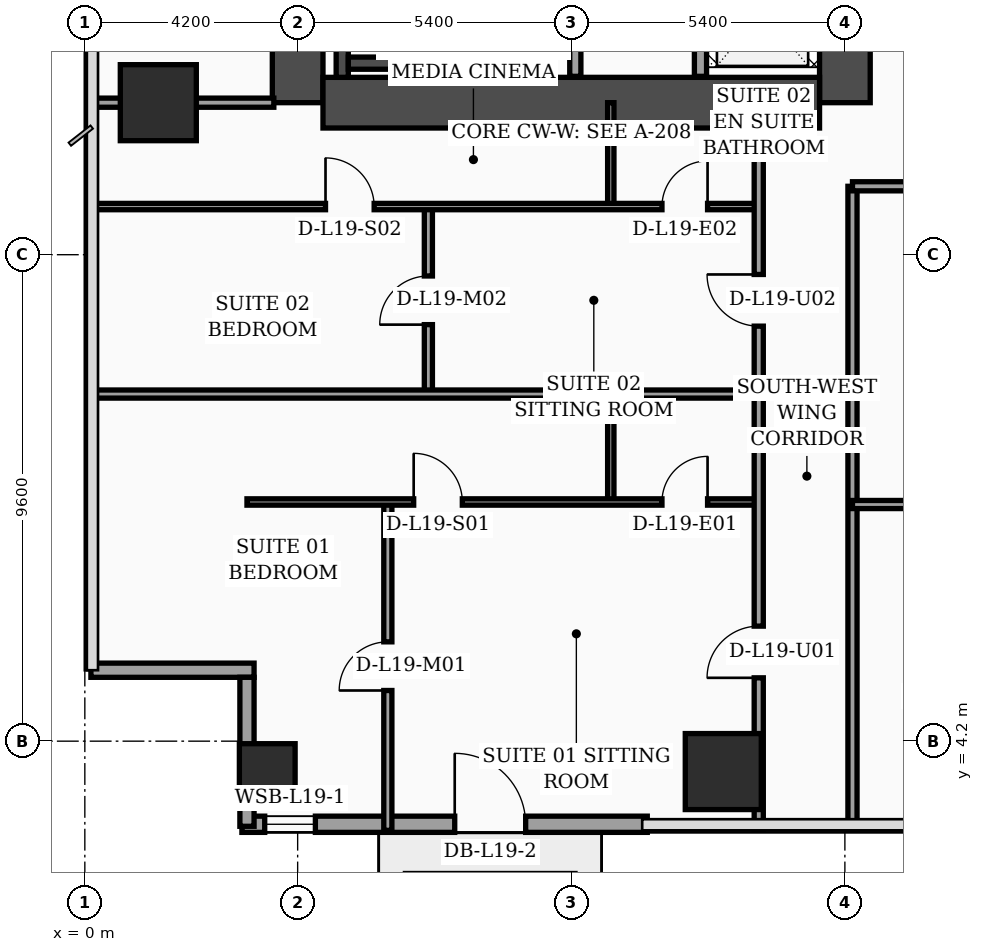
"""IFC4 building model, lengths in metres.
Left out: names, types, materials, properties, quantities, classifications, styles, units other than length and angle.
Written with IfcOpenShell. Run it as: python <this file> out.ifc"""

import sys

from ifc_helpers import new_model, si_unit, direction, frame, frame_2d, origin, origin_2d, place, context, subcontext, project, spatial, rectangle, hollow_rectangle, extrude, element, fill, save


model = new_model("IFC4")
c1 = context("Model", 3, precision=1e-05, world=origin(), true_north=direction((0.0, 1.0)))
c2 = subcontext(c1, "Body", "Model", "MODEL_VIEW")
j1 = project(units=[si_unit("LENGTHUNIT", "METRE"), si_unit("PLANEANGLEUNIT", "RADIAN")], contexts=[c1])
p1 = place(None, origin())
s1 = spatial("IfcSite", under=j1, at=p1, CompositionType="ELEMENT")
p2 = place(p1, origin())
s2 = spatial("IfcBuilding", under=s1, at=p2, CompositionType="ELEMENT")
p3 = place(p2, frame((0.0, 0.0, 81.2)))
s3 = spatial("IfcBuildingStorey", under=s2, at=p3, CompositionType="ELEMENT", Elevation=81.2)
p4 = place(p3, frame((4.2, 16.8, 0.0), z_axis=(0.0, 0.0, 1.0), x_axis=(0.0, 1.0, 0.0)))
e1 = element("IfcWall", 1, at=p4, inside=s3, PredefinedType="SHEAR", context=c2, shape_type="SweptSolid", body=[
    extrude(rectangle(XDim=21.6, YDim=1.0, at=frame_2d((10.8, 0.0))), origin(), (0.0, 0.0, 1.0), 3.56),
])
p5 = place(p3, frame((15.0, 16.8, 0.0), z_axis=(0.0, 0.0, 1.0), x_axis=(0.0, 1.0, 0.0)))
e2 = element("IfcWall", 2, at=p5, inside=s3, PredefinedType="SHEAR", context=c2, shape_type="SweptSolid", body=[
    extrude(rectangle(XDim=21.6, YDim=1.0, at=frame_2d((10.8, 0.0))), origin(), (0.0, 0.0, 1.0), 3.56),
])
p6 = place(p5, frame((8.65, 0.0, 0.0)))
e3 = element("IfcOpeningElement", 3, at=p6, cuts=e2, PredefinedType="OPENING", context=c2, shape_type="SweptSolid", body=[
    extrude(rectangle(XDim=1.1, YDim=2.2, at=frame_2d((0.55, 1.1))), frame((0.0, 0.51, 0.0), z_axis=(0.0, -1.0, 0.0), x_axis=(1.0, 0.0, 0.0)), (0.0, 0.0, 1.0), 1.02),
])
p7 = place(p5, frame((1.25, 0.0, 0.0)))
e4 = element("IfcOpeningElement", 4, at=p7, cuts=e2, PredefinedType="OPENING", context=c2, shape_type="SweptSolid", body=[
    extrude(rectangle(XDim=1.1, YDim=2.2, at=frame_2d((0.55, 1.1))), frame((0.0, 0.51, 0.0), z_axis=(0.0, -1.0, 0.0), x_axis=(1.0, 0.0, 0.0)), (0.0, 0.0, 1.0), 1.02),
])
p8 = place(p5, frame((3.8, 0.0, 0.0)))
e5 = element("IfcOpeningElement", 5, at=p8, cuts=e2, PredefinedType="OPENING", context=c2, shape_type="SweptSolid", body=[
    extrude(rectangle(XDim=1.1, YDim=2.2, at=frame_2d((0.55, 1.1))), frame((0.0, 0.51, 0.0), z_axis=(0.0, -1.0, 0.0), x_axis=(1.0, 0.0, 0.0)), (0.0, 0.0, 1.0), 1.02),
])
p9 = place(p5, frame((6.35, 0.0, 0.0)))
e6 = element("IfcOpeningElement", 6, at=p9, cuts=e2, PredefinedType="OPENING", context=c2, shape_type="SweptSolid", body=[
    extrude(rectangle(XDim=1.1, YDim=2.2, at=frame_2d((0.55, 1.1))), frame((0.0, 0.51, 0.0), z_axis=(0.0, -1.0, 0.0), x_axis=(1.0, 0.0, 0.0)), (0.0, 0.0, 1.0), 1.02),
])
p10 = place(p3, frame((4.7, 16.8, 0.0), z_axis=(0.0, 0.0, 1.0), x_axis=(1.0, 0.0, 0.0)))
e7 = element("IfcWall", 7, at=p10, inside=s3, PredefinedType="SHEAR", context=c2, shape_type="SweptSolid", body=[
    extrude(rectangle(XDim=9.8, YDim=1.0, at=frame_2d((4.9, 0.0))), origin(), (0.0, 0.0, 1.0), 3.56),
])
p11 = place(p3, frame((5.08, 17.3, 0.0), z_axis=(0.0, 0.0, 1.0), x_axis=(0.0, 1.0, 0.0)))
e8 = element("IfcWall", 8, at=p11, inside=s3, PredefinedType="SOLIDWALL", context=c2, shape_type="SweptSolid", body=[
    extrude(rectangle(XDim=9.49, YDim=0.24, at=frame_2d((4.745, 0.0))), origin(), (0.0, 0.0, 1.0), 3.56),
])
p12 = place(p3, frame((8.42, 17.3, 0.0), z_axis=(0.0, 0.0, 1.0), x_axis=(0.0, 1.0, 0.0)))
e9 = element("IfcWall", 9, at=p12, inside=s3, PredefinedType="SOLIDWALL", context=c2, shape_type="SweptSolid", body=[
    extrude(rectangle(XDim=9.49, YDim=0.24, at=frame_2d((4.745, 0.0))), origin(), (0.0, 0.0, 1.0), 3.56),
])
p13 = place(p12, frame((0.35, 0.0, 0.0)))
e10 = element("IfcOpeningElement", 10, at=p13, cuts=e9, PredefinedType="OPENING", context=c2, shape_type="SweptSolid", body=[
    extrude(rectangle(XDim=1.15, YDim=2.2, at=frame_2d((0.575, 1.1))), frame((0.0, 0.13, 0.0), z_axis=(0.0, -1.0, 0.0), x_axis=(1.0, 0.0, 0.0)), (0.0, 0.0, 1.0), 0.26),
])
p14 = place(p3, frame((5.2, 17.58, 0.0), z_axis=(0.0, 0.0, 1.0), x_axis=(1.0, 0.0, 0.0)))
e11 = element("IfcWall", 11, at=p14, inside=s3, PredefinedType="SOLIDWALL", context=c2, shape_type="SweptSolid", body=[
    extrude(rectangle(XDim=3.1, YDim=0.24, at=frame_2d((1.55, 0.0))), origin(), (0.0, 0.0, 1.0), 3.56),
])
p15 = place(p3, frame((3.6, 3.6, 0.0), z_axis=(0.0, 0.0, 1.0), x_axis=(1.0, 0.0, 0.0)))
e12 = element("IfcColumn", 12, at=p15, inside=s3, PredefinedType="COLUMN", context=c2, shape_type="SweptSolid", body=[
    extrude(hollow_rectangle(XDim=1.1, YDim=1.1, WallThickness=0.045, at=origin_2d()), origin(), (0.0, 0.0, 1.0), 3.56),
])
for number, where, z_axis, x_axis in (
    (13, (1.45, 16.8, 0.0), (0.0, 0.0, 1.0), (1.0, 0.0, 0.0)),
    (14, (12.6, 3.6, 0.0), (0.0, 0.0, 1.0), (1.0, 0.0, 0.0)),
):
    element("IfcColumn", number, at=place(p3, frame(where, z_axis=z_axis, x_axis=x_axis)), inside=s3, PredefinedType="COLUMN", context=c2, shape_type="SweptSolid", body=[
        extrude(rectangle(XDim=1.5, YDim=1.5, at=origin_2d()), origin(), (0.0, 0.0, 1.0), 3.56),
    ])
p16 = place(p3, frame((3.1, 2.56, 0.0), z_axis=(0.0, 0.0, 1.0), x_axis=(1.0, 0.0, 0.0)))
e15 = element("IfcWall", 15, at=p16, inside=s3, PredefinedType="SOLIDWALL", context=c2, shape_type="SweptSolid", body=[
    extrude(rectangle(XDim=8.0, YDim=0.32, at=frame_2d((4.0, 0.0))), origin(), (0.0, 0.0, 1.0), 3.56),
])
p17 = place(p16, frame((0.45, 0.0, 0.75)))
e16 = element("IfcOpeningElement", 16, at=p17, cuts=e15, PredefinedType="OPENING", context=c2, shape_type="SweptSolid", body=[
    extrude(rectangle(XDim=1.0, YDim=1.6, at=frame_2d((0.5, 0.8))), frame((0.0, 0.17, 0.0), z_axis=(0.0, -1.0, 0.0), x_axis=(1.0, 0.0, 0.0)), (0.0, 0.0, 1.0), 0.34),
])
p18 = place(p16, frame((4.2, 0.0, 0.0)))
e17 = element("IfcOpeningElement", 17, at=p18, cuts=e15, PredefinedType="OPENING", context=c2, shape_type="SweptSolid", body=[
    extrude(rectangle(XDim=1.4, YDim=2.25, at=frame_2d((0.7, 1.125))), frame((0.0, 0.17, 0.0), z_axis=(0.0, -1.0, 0.0), x_axis=(1.0, 0.0, 0.0)), (0.0, 0.0, 1.0), 0.34),
])
p19 = place(p3, frame((0.12, 5.6, 0.0), z_axis=(0.0, 0.0, 1.0), x_axis=(1.0, 0.0, 0.0)))
e18 = element("IfcWall", 18, at=p19, inside=s3, PredefinedType="SOLIDWALL", context=c2, shape_type="SweptSolid", body=[
    extrude(rectangle(XDim=3.22, YDim=0.28, at=frame_2d((1.61, 0.0))), origin(), (0.0, 0.0, 1.0), 2.84),
])
p20 = place(p3, frame((3.2, 5.46, 0.0), z_axis=(0.0, 0.0, 1.0), x_axis=(0.0, -1.0, 0.0)))
e19 = element("IfcWall", 19, at=p20, inside=s3, PredefinedType="SOLIDWALL", context=c2, shape_type="SweptSolid", body=[
    extrude(rectangle(XDim=2.94, YDim=0.28, at=frame_2d((1.47, 0.0))), origin(), (0.0, 0.0, 1.0), 2.84),
])
p21 = place(p3, frame((9.68, 17.32, 0.0), z_axis=(0.0, 0.0, 1.0), x_axis=(0.0, 1.0, 0.0)))
e20 = element("IfcWall", 20, at=p21, inside=s3, PredefinedType="SOLIDWALL", context=c2, shape_type="SweptSolid", body=[
    extrude(rectangle(XDim=7.68, YDim=0.22, at=frame_2d((3.84, 0.0))), origin(), (0.0, 0.0, 1.0), 3.56),
])
p22 = place(p3, frame((12.15, 17.32, 0.0), z_axis=(0.0, 0.0, 1.0), x_axis=(0.0, 1.0, 0.0)))
e21 = element("IfcWall", 21, at=p22, inside=s3, PredefinedType="SOLIDWALL", context=c2, shape_type="SweptSolid", body=[
    extrude(rectangle(XDim=7.65, YDim=0.24, at=frame_2d((3.825, 0.0))), origin(), (0.0, 0.0, 1.0), 3.56),
])
p23 = place(p3, frame((0.08, 16.8, 0.0), z_axis=(0.0, 0.0, 1.0), x_axis=(1.0, 0.0, 0.0)))
e22 = element("IfcWall", 22, at=p23, inside=s3, PredefinedType="PARTITIONING", context=c2, shape_type="SweptSolid", body=[
    extrude(rectangle(XDim=3.65, YDim=0.18, at=frame_2d((1.825, 0.0))), origin(), (0.0, 0.0, 1.0), 2.84),
])
p24 = place(p3, frame((10.38, 8.92, 0.0), z_axis=(0.0, 0.0, 1.0), x_axis=(0.0, 1.0, 0.0)))
e23 = element("IfcWall", 23, at=p24, inside=s3, PredefinedType="PARTITIONING", context=c2, shape_type="SweptSolid", body=[
    extrude(rectangle(XDim=2.13, YDim=0.125, at=frame_2d((1.065, 0.0))), origin(), (0.0, 0.0, 1.0), 3.09),
])
p25 = place(p3, frame((5.98, 2.44, 0.0), z_axis=(0.0, 0.0, 1.0), x_axis=(0.0, 1.0, 0.0)))
e24 = element("IfcWall", 24, at=p25, inside=s3, PredefinedType="PARTITIONING", context=c2, shape_type="SweptSolid", body=[
    extrude(rectangle(XDim=6.48, YDim=0.16, at=frame_2d((3.24, 0.0))), origin(), (0.0, 0.0, 1.0), 3.04),
])
p26 = place(p25, frame((2.76, 0.0, 0.0)))
e25 = element("IfcOpeningElement", 25, at=p26, cuts=e24, PredefinedType="OPENING", context=c2, shape_type="SweptSolid", body=[
    extrude(rectangle(XDim=0.96, YDim=2.2, at=frame_2d((0.48, 1.1))), frame((0.0, 0.09, 0.0), z_axis=(0.0, -1.0, 0.0), x_axis=(1.0, 0.0, 0.0)), (0.0, 0.0, 1.0), 0.18),
])
p27 = place(p3, frame((3.2, 8.92, 0.0), z_axis=(0.0, 0.0, 1.0), x_axis=(1.0, 0.0, 0.0)))
e26 = element("IfcWall", 26, at=p27, inside=s3, PredefinedType="PARTITIONING", context=c2, shape_type="SweptSolid", body=[
    extrude(rectangle(XDim=10.1, YDim=0.125, at=frame_2d((5.05, 0.0))), origin(), (0.0, 0.0, 1.0), 2.84),
])
p28 = place(p27, frame((3.29, 0.0, 0.0)))
e27 = element("IfcOpeningElement", 27, at=p28, cuts=e26, PredefinedType="OPENING", context=c2, shape_type="SweptSolid", body=[
    extrude(rectangle(XDim=0.96, YDim=2.2, at=frame_2d((0.48, 1.1))), frame((0.0, 0.073, 0.0), z_axis=(0.0, -1.0, 0.0), x_axis=(1.0, 0.0, 0.0)), (0.0, 0.0, 1.0), 0.145),
])
p29 = place(p27, frame((8.19, 0.0, 0.0)))
e28 = element("IfcOpeningElement", 28, at=p29, cuts=e26, PredefinedType="OPENING", context=c2, shape_type="SweptSolid", body=[
    extrude(rectangle(XDim=0.9, YDim=2.15, at=frame_2d((0.45, 1.075))), frame((0.0, 0.073, 0.0), z_axis=(0.0, -1.0, 0.0), x_axis=(1.0, 0.0, 0.0)), (0.0, 0.0, 1.0), 0.145),
])
p30 = place(p3, frame((10.38, 14.75, 0.0), z_axis=(0.0, 0.0, 1.0), x_axis=(0.0, 1.0, 0.0)))
e29 = element("IfcWall", 29, at=p30, inside=s3, PredefinedType="PARTITIONING", context=c2, shape_type="SweptSolid", body=[
    extrude(rectangle(XDim=2.05, YDim=0.125, at=frame_2d((1.025, 0.0))), origin(), (0.0, 0.0, 1.0), 3.56),
])
p31 = place(p3, frame((6.78, 11.05, 0.0), z_axis=(0.0, 0.0, 1.0), x_axis=(0.0, 1.0, 0.0)))
e30 = element("IfcWall", 30, at=p31, inside=s3, PredefinedType="PARTITIONING", context=c2, shape_type="SweptSolid", body=[
    extrude(rectangle(XDim=3.7, YDim=0.16, at=frame_2d((1.85, 0.0))), origin(), (0.0, 0.0, 1.0), 3.56),
])
p32 = place(p31, frame((1.37, 0.0, 0.0)))
e31 = element("IfcOpeningElement", 31, at=p32, cuts=e30, PredefinedType="OPENING", context=c2, shape_type="SweptSolid", body=[
    extrude(rectangle(XDim=0.96, YDim=2.2, at=frame_2d((0.48, 1.1))), frame((0.0, 0.09, 0.0), z_axis=(0.0, -1.0, 0.0), x_axis=(1.0, 0.0, 0.0)), (0.0, 0.0, 1.0), 0.18),
])
p33 = place(p3, frame((0.08, 14.75, 0.0), z_axis=(0.0, 0.0, 1.0), x_axis=(1.0, 0.0, 0.0)))
e32 = element("IfcWall", 32, at=p33, inside=s3, PredefinedType="PARTITIONING", context=c2, shape_type="SweptSolid", body=[
    extrude(rectangle(XDim=13.22, YDim=0.125, at=frame_2d((6.61, 0.0))), origin(), (0.0, 0.0, 1.0), 2.84),
])
p34 = place(p33, frame((4.67, 0.0, 0.0)))
e33 = element("IfcOpeningElement", 33, at=p34, cuts=e32, PredefinedType="OPENING", context=c2, shape_type="SweptSolid", body=[
    extrude(rectangle(XDim=0.96, YDim=2.2, at=frame_2d((0.48, 1.1))), frame((0.0, 0.073, 0.0), z_axis=(0.0, -1.0, 0.0), x_axis=(1.0, 0.0, 0.0)), (0.0, 0.0, 1.0), 0.145),
])
p35 = place(p33, frame((11.31, 0.0, 0.0)))
e34 = element("IfcOpeningElement", 34, at=p35, cuts=e32, PredefinedType="OPENING", context=c2, shape_type="SweptSolid", body=[
    extrude(rectangle(XDim=0.9, YDim=2.15, at=frame_2d((0.45, 1.075))), frame((0.0, 0.073, 0.0), z_axis=(0.0, -1.0, 0.0), x_axis=(1.0, 0.0, 0.0)), (0.0, 0.0, 1.0), 0.145),
])
p36 = place(p3, frame((0.08, 11.05, 0.0), z_axis=(0.0, 0.0, 1.0), x_axis=(1.0, 0.0, 0.0)))
e35 = element("IfcWall", 35, at=p36, inside=s3, PredefinedType="PARTITIONING", context=c2, shape_type="SweptSolid", body=[
    extrude(rectangle(XDim=13.22, YDim=0.16, at=frame_2d((6.61, 0.0))), origin(), (0.0, 0.0, 1.0), 2.84),
])
p37 = place(p3, frame((13.3, 2.44, 0.0), z_axis=(0.0, 0.0, 1.0), x_axis=(0.0, 1.0, 0.0)))
e36 = element("IfcWall", 36, at=p37, inside=s3, PredefinedType="PARTITIONING", context=c2, shape_type="SweptSolid", body=[
    extrude(rectangle(XDim=14.36, YDim=0.18, at=frame_2d((7.18, 0.0))), origin(), (0.0, 0.0, 1.0), 3.04),
])
p38 = place(p37, frame((3.01, 0.0, 0.0)))
e37 = element("IfcOpeningElement", 37, at=p38, cuts=e36, PredefinedType="OPENING", context=c2, shape_type="SweptSolid", body=[
    extrude(rectangle(XDim=1.02, YDim=2.2, at=frame_2d((0.51, 1.1))), frame((0.0, 0.1, 0.0), z_axis=(0.0, -1.0, 0.0), x_axis=(1.0, 0.0, 0.0)), (0.0, 0.0, 1.0), 0.2),
])
p39 = place(p37, frame((9.95, 0.0, 0.0)))
e38 = element("IfcOpeningElement", 38, at=p39, cuts=e36, PredefinedType="OPENING", context=c2, shape_type="SweptSolid", body=[
    extrude(rectangle(XDim=1.02, YDim=2.2, at=frame_2d((0.51, 1.1))), frame((0.0, 0.1, 0.0), z_axis=(0.0, -1.0, 0.0), x_axis=(1.0, 0.0, 0.0)), (0.0, 0.0, 1.0), 0.2),
])
p40 = place(p3, frame((15.15, 2.44, 0.0), z_axis=(0.0, 0.0, 1.0), x_axis=(0.0, 1.0, 0.0)))
e39 = element("IfcWall", 39, at=p40, inside=s3, PredefinedType="PARTITIONING", context=c2, shape_type="SweptSolid", body=[
    extrude(rectangle(XDim=12.71, YDim=0.18, at=frame_2d((6.355, 0.0))), origin(), (0.0, 0.0, 1.0), 3.04),
])
p41 = place(p3, frame((15.15, 8.87, 0.0), z_axis=(0.0, 0.0, 1.0), x_axis=(1.0, 0.0, 0.0)))
e40 = element("IfcWall", 40, at=p41, inside=s3, PredefinedType="PARTITIONING", context=c2, shape_type="SweptSolid", body=[
    extrude(rectangle(XDim=4.45, YDim=0.16, at=frame_2d((2.225, 0.0))), origin(), (0.0, 0.0, 1.0), 3.56),
])
p42 = place(p41, frame((1.75, 0.0, 0.0)))
e41 = element("IfcOpeningElement", 41, at=p42, cuts=e40, PredefinedType="OPENING", context=c2, shape_type="SweptSolid", body=[
    extrude(rectangle(XDim=0.96, YDim=2.2, at=frame_2d((0.48, 1.1))), frame((0.0, 0.09, 0.0), z_axis=(0.0, -1.0, 0.0), x_axis=(1.0, 0.0, 0.0)), (0.0, 0.0, 1.0), 0.18),
])
p43 = place(p3, frame((15.15, 15.15, 0.0), z_axis=(0.0, 0.0, 1.0), x_axis=(1.0, 0.0, 0.0)))
e42 = element("IfcWall", 42, at=p43, inside=s3, PredefinedType="PARTITIONING", context=c2, shape_type="SweptSolid", body=[
    extrude(rectangle(XDim=6.45, YDim=0.18, at=frame_2d((3.225, 0.0))), origin(), (0.0, 0.0, 1.0), 2.34),
])
p44 = place(p43, frame((1.74, 0.0, 0.0)))
e43 = element("IfcOpeningElement", 43, at=p44, cuts=e42, PredefinedType="OPENING", context=c2, shape_type="SweptSolid", body=[
    extrude(rectangle(XDim=1.02, YDim=2.2, at=frame_2d((0.51, 1.1))), frame((0.0, 0.1, 0.0), z_axis=(0.0, -1.0, 0.0), x_axis=(1.0, 0.0, 0.0)), (0.0, 0.0, 1.0), 0.2),
])
p45 = place(p17, origin())
e44 = element("IfcWindow", 44, at=p45, inside=s3, PartitioningType="SINGLE_PANEL", PredefinedType="WINDOW", context=c2, shape_type="SweptSolid", body=[
    extrude(rectangle(XDim=1.0, YDim=1.6, at=frame_2d((0.5, 0.8))), frame((0.0, 0.03, 0.0), z_axis=(0.0, -1.0, 0.0), x_axis=(1.0, 0.0, 0.0)), (0.0, 0.0, 1.0), 0.06),
])
fill(e16, e44)
p46 = place(p18, origin())
e45 = element("IfcDoor", 45, at=p46, inside=s3, OperationType="SINGLE_SWING_LEFT", PredefinedType="DOOR", context=c2, shape_type="SweptSolid", body=[
    extrude(rectangle(XDim=1.4, YDim=2.25, at=frame_2d((0.7, 1.125))), frame((0.0, 0.025, 0.0), z_axis=(0.0, -1.0, 0.0), x_axis=(1.0, 0.0, 0.0)), (0.0, 0.0, 1.0), 0.05),
])
fill(e17, e45)
p47 = place(p26, origin())
e46 = element("IfcDoor", 46, at=p47, inside=s3, OperationType="SINGLE_SWING_LEFT", PredefinedType="DOOR", context=c2, shape_type="SweptSolid", body=[
    extrude(rectangle(XDim=0.96, YDim=2.2, at=frame_2d((0.48, 1.1))), frame((0.0, 0.025, 0.0), z_axis=(0.0, -1.0, 0.0), x_axis=(1.0, 0.0, 0.0)), (0.0, 0.0, 1.0), 0.05),
])
fill(e25, e46)
p48 = place(p28, origin())
e47 = element("IfcDoor", 47, at=p48, inside=s3, OperationType="SINGLE_SWING_LEFT", PredefinedType="DOOR", context=c2, shape_type="SweptSolid", body=[
    extrude(rectangle(XDim=0.96, YDim=2.2, at=frame_2d((0.48, 1.1))), frame((0.0, 0.025, 0.0), z_axis=(0.0, -1.0, 0.0), x_axis=(1.0, 0.0, 0.0)), (0.0, 0.0, 1.0), 0.05),
])
fill(e27, e47)
p49 = place(p29, origin())
e48 = element("IfcDoor", 48, at=p49, inside=s3, OperationType="SINGLE_SWING_RIGHT", PredefinedType="DOOR", context=c2, shape_type="SweptSolid", body=[
    extrude(rectangle(XDim=0.9, YDim=2.15, at=frame_2d((0.45, 1.075))), frame((0.0, 0.025, 0.0), z_axis=(0.0, -1.0, 0.0), x_axis=(1.0, 0.0, 0.0)), (0.0, 0.0, 1.0), 0.05),
])
fill(e28, e48)
p50 = place(p32, origin())
e49 = element("IfcDoor", 49, at=p50, inside=s3, OperationType="SINGLE_SWING_LEFT", PredefinedType="DOOR", context=c2, shape_type="SweptSolid", body=[
    extrude(rectangle(XDim=0.96, YDim=2.2, at=frame_2d((0.48, 1.1))), frame((0.0, 0.025, 0.0), z_axis=(0.0, -1.0, 0.0), x_axis=(1.0, 0.0, 0.0)), (0.0, 0.0, 1.0), 0.05),
])
fill(e31, e49)
p51 = place(p34, origin())
e50 = element("IfcDoor", 50, at=p51, inside=s3, OperationType="SINGLE_SWING_LEFT", PredefinedType="DOOR", context=c2, shape_type="SweptSolid", body=[
    extrude(rectangle(XDim=0.96, YDim=2.2, at=frame_2d((0.48, 1.1))), frame((0.0, 0.025, 0.0), z_axis=(0.0, -1.0, 0.0), x_axis=(1.0, 0.0, 0.0)), (0.0, 0.0, 1.0), 0.05),
])
fill(e33, e50)
p52 = place(p35, origin())
e51 = element("IfcDoor", 51, at=p52, inside=s3, OperationType="SINGLE_SWING_RIGHT", PredefinedType="DOOR", context=c2, shape_type="SweptSolid", body=[
    extrude(rectangle(XDim=0.9, YDim=2.15, at=frame_2d((0.45, 1.075))), frame((0.0, 0.025, 0.0), z_axis=(0.0, -1.0, 0.0), x_axis=(1.0, 0.0, 0.0)), (0.0, 0.0, 1.0), 0.05),
])
fill(e34, e51)
p53 = place(p38, origin())
e52 = element("IfcDoor", 52, at=p53, inside=s3, OperationType="SINGLE_SWING_LEFT", PredefinedType="DOOR", context=c2, shape_type="SweptSolid", body=[
    extrude(rectangle(XDim=1.02, YDim=2.2, at=frame_2d((0.51, 1.1))), frame((0.0, 0.025, 0.0), z_axis=(0.0, -1.0, 0.0), x_axis=(1.0, 0.0, 0.0)), (0.0, 0.0, 1.0), 0.05),
])
fill(e37, e52)
p54 = place(p39, origin())
e53 = element("IfcDoor", 53, at=p54, inside=s3, OperationType="SINGLE_SWING_RIGHT", PredefinedType="DOOR", context=c2, shape_type="SweptSolid", body=[
    extrude(rectangle(XDim=1.02, YDim=2.2, at=frame_2d((0.51, 1.1))), frame((0.0, 0.025, 0.0), z_axis=(0.0, -1.0, 0.0), x_axis=(1.0, 0.0, 0.0)), (0.0, 0.0, 1.0), 0.05),
])
fill(e38, e53)
p55 = place(p13, origin())
e54 = element("IfcDoor", 54, at=p55, inside=s3, OperationType="SINGLE_SWING_LEFT", PredefinedType="DOOR", context=c2, shape_type="SweptSolid", body=[
    extrude(rectangle(XDim=1.15, YDim=2.2, at=frame_2d((0.575, 1.1))), frame((0.0, 0.025, 0.0), z_axis=(0.0, -1.0, 0.0), x_axis=(1.0, 0.0, 0.0)), (0.0, 0.0, 1.0), 0.05),
])
fill(e10, e54)
save(model, sys.argv[1])
